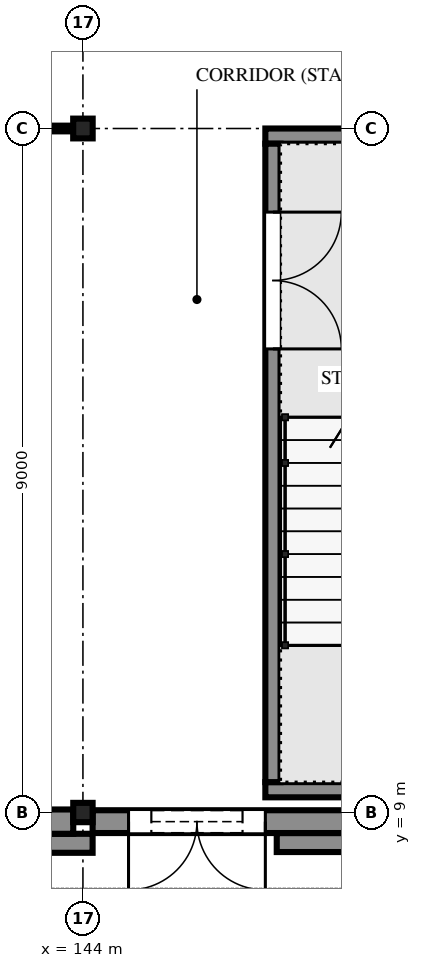
"""IFC4 building model, lengths in metres.
Left out: names, types, materials, properties, quantities, classifications, styles, units other than length and angle.
Written with IfcOpenShell. Run it as: python <this file> out.ifc"""

import sys

from ifc_helpers import new_model, si_unit, direction, frame, frame_2d, origin, origin_2d, place, context, subcontext, project, spatial, polyline, rectangle, i_section, outline, extrude, element, fill, save


model = new_model("IFC4")
c1 = context("Model", 3, precision=1e-05, world=origin(), true_north=direction((0.0, 1.0)))
c2 = subcontext(c1, "Body", "Model", "MODEL_VIEW")
j1 = project(units=[si_unit("LENGTHUNIT", "METRE"), si_unit("PLANEANGLEUNIT", "RADIAN")], contexts=[c1])
p1 = place(None, origin())
s1 = spatial("IfcSite", under=j1, at=p1, CompositionType="ELEMENT")
p2 = place(p1, origin())
s2 = spatial("IfcBuilding", under=s1, at=p2, CompositionType="ELEMENT")
p3 = place(p2, origin())
s3 = spatial("IfcBuildingStorey", under=s2, at=p3, CompositionType="ELEMENT", Elevation=0.0)
p4 = place(p3, frame((144.0, 9.0, -2.1), z_axis=(0.0, 0.0, 1.0), x_axis=(1.0, 0.0, 0.0)))
e1 = element("IfcColumn", 1, at=p4, inside=s3, PredefinedType="COLUMN", context=c2, shape_type="SweptSolid", body=[
    extrude(i_section(OverallWidth=0.255, OverallDepth=0.254, WebThickness=0.009, FlangeThickness=0.014, FilletRadius=0.013, at=origin_2d()), origin(), (0.0, 0.0, 1.0), 9.6),
])
p5 = place(p3, frame((144.0, 18.0, -2.1), z_axis=(0.0, 0.0, 1.0), x_axis=(1.0, 0.0, 0.0)))
e2 = element("IfcColumn", 2, at=p5, inside=s3, PredefinedType="COLUMN", context=c2, shape_type="SweptSolid", body=[
    extrude(i_section(OverallWidth=0.256, OverallDepth=0.26, WebThickness=0.01, FlangeThickness=0.017, FilletRadius=0.013, at=origin_2d()), origin(), (0.0, 0.0, 1.0), 9.6),
])
p6 = place(p3, frame((135.127, 8.88, 0.0), z_axis=(0.0, 0.0, 1.0), x_axis=(1.0, 0.0, 0.0)))
e3 = element("IfcWall", 3, at=p6, inside=s3, PredefinedType="SOLIDWALL", context=c2, shape_type="SweptSolid", body=[
    extrude(rectangle(XDim=8.746, YDim=0.32, at=frame_2d((4.373, 0.0))), origin(), (0.0, 0.0, 1.0), 6.767),
])
p7 = place(p6, frame((3.473, 0.0, 0.0)))
e4 = element("IfcOpeningElement", 4, at=p7, cuts=e3, PredefinedType="OPENING", context=c2, shape_type="SweptSolid", body=[
    extrude(rectangle(XDim=1.8, YDim=2.1, at=frame_2d((0.9, 1.05))), frame((0.0, 0.17, 0.0), z_axis=(0.0, -1.0, 0.0), x_axis=(1.0, 0.0, 0.0)), (0.0, 0.0, 1.0), 0.34),
])
p8 = place(p6, frame((3.773, 0.0, 2.55)))
e5 = element("IfcOpeningElement", 5, at=p8, cuts=e3, PredefinedType="OPENING", context=c2, shape_type="SweptSolid", body=[
    extrude(rectangle(XDim=1.2, YDim=0.6, at=frame_2d((0.6, 0.3))), frame((0.0, 0.17, 0.0), z_axis=(0.0, -1.0, 0.0), x_axis=(1.0, 0.0, 0.0)), (0.0, 0.0, 1.0), 0.34),
])
p9 = place(p6, frame((0.473, 0.0, 0.9)))
e6 = element("IfcOpeningElement", 6, at=p9, cuts=e3, PredefinedType="OPENING", context=c2, shape_type="SweptSolid", body=[
    extrude(rectangle(XDim=1.8, YDim=3.6, at=frame_2d((0.9, 1.8))), frame((0.0, 0.17, 0.0), z_axis=(0.0, -1.0, 0.0), x_axis=(1.0, 0.0, 0.0)), (0.0, 0.0, 1.0), 0.34),
])
p10 = place(p6, frame((6.473, 0.0, 0.9)))
e7 = element("IfcOpeningElement", 7, at=p10, cuts=e3, PredefinedType="OPENING", context=c2, shape_type="SweptSolid", body=[
    extrude(rectangle(XDim=1.8, YDim=3.6, at=frame_2d((0.9, 1.8))), frame((0.0, 0.17, 0.0), z_axis=(0.0, -1.0, 0.0), x_axis=(1.0, 0.0, 0.0)), (0.0, 0.0, 1.0), 0.34),
])
p11 = place(p3, frame((144.127, 8.88, 0.0), z_axis=(0.0, 0.0, 1.0), x_axis=(1.0, 0.0, 0.0)))
e8 = element("IfcWall", 8, at=p11, inside=s3, PredefinedType="SOLIDWALL", context=c2, shape_type="SweptSolid", body=[
    extrude(rectangle(XDim=8.746, YDim=0.3, at=frame_2d((4.373, 0.0))), origin(), (0.0, 0.0, 1.0), 6.767),
])
p12 = place(p11, frame((0.473, 0.0, 0.0)))
e9 = element("IfcOpeningElement", 9, at=p12, cuts=e8, PredefinedType="OPENING", context=c2, shape_type="SweptSolid", body=[
    extrude(rectangle(XDim=1.8, YDim=2.4, at=frame_2d((0.9, 1.2))), frame((0.0, 0.16, 0.0), z_axis=(0.0, -1.0, 0.0), x_axis=(1.0, 0.0, 0.0)), (0.0, 0.0, 1.0), 0.32),
])
p13 = place(p11, frame((0.773, 0.0, 2.55)))
e10 = element("IfcOpeningElement", 10, at=p13, cuts=e8, PredefinedType="OPENING", context=c2, shape_type="SweptSolid", body=[
    extrude(rectangle(XDim=1.2, YDim=0.6, at=frame_2d((0.6, 0.3))), frame((0.0, 0.16, 0.0), z_axis=(0.0, -1.0, 0.0), x_axis=(1.0, 0.0, 0.0)), (0.0, 0.0, 1.0), 0.32),
])
p14 = place(p11, frame((3.923, 0.0, 1.2)))
e11 = element("IfcOpeningElement", 11, at=p14, cuts=e8, PredefinedType="OPENING", context=c2, shape_type="SweptSolid", body=[
    extrude(rectangle(XDim=0.9, YDim=1.8, at=frame_2d((0.45, 0.9))), frame((0.0, 0.16, 0.0), z_axis=(0.0, -1.0, 0.0), x_axis=(1.0, 0.0, 0.0)), (0.0, 0.0, 1.0), 0.32),
])
p15 = place(p3, frame((140.55, 8.595, 0.0), z_axis=(0.0, 0.0, 1.0), x_axis=(1.0, 0.0, 0.0)))
e12 = element("IfcWall", 12, at=p15, inside=s3, PredefinedType="SOLIDWALL", context=c2, shape_type="SweptSolid", body=[
    extrude(outline(polyline([(0.0, 0.0), (3.577, 0.0), (3.577, 6.767), (0.0, 6.767), (0.0, 0.0)]), holes=[polyline([(0.9, 0.75), (0.9, 4.5), (0.942, 4.752), (1.11, 4.968), (1.257, 5.022), (1.383, 5.166), (1.656, 5.31), (1.95, 5.4), (2.244, 5.31), (2.517, 5.166), (2.643, 5.022), (2.79, 4.968), (2.958, 4.752), (3.0, 4.5), (3.0, 0.75), (0.9, 0.75)])]), frame((0.0, 0.125, 0.0), z_axis=(0.0, -1.0, 0.0), x_axis=(1.0, 0.0, 0.0)), (0.0, 0.0, 1.0), 0.25),
])
p16 = place(p3, frame((146.55, 8.605, 0.0), z_axis=(0.0, 0.0, 1.0), x_axis=(1.0, 0.0, 0.0)))
e13 = element("IfcWall", 13, at=p16, inside=s3, PredefinedType="SOLIDWALL", context=c2, shape_type="SweptSolid", body=[
    extrude(outline(polyline([(0.0, 0.0), (6.86, 0.0), (6.86, 6.767), (0.0, 6.767), (0.0, 0.0)]), holes=[polyline([(1.35, 1.05), (1.35, 3.0), (1.374, 3.252), (1.47, 3.468), (1.554, 3.522), (1.626, 3.666), (1.782, 3.81), (1.95, 3.9), (2.118, 3.81), (2.274, 3.666), (2.346, 3.522), (2.43, 3.468), (2.526, 3.252), (2.55, 3.0), (2.55, 1.05), (1.35, 1.05)])]), frame((0.0, 0.125, 0.0), z_axis=(0.0, -1.0, 0.0), x_axis=(1.0, 0.0, 0.0)), (0.0, 0.0, 1.0), 0.25),
])
p17 = place(p3, frame((146.4, 9.3, 0.0), z_axis=(0.0, 0.0, 1.0), x_axis=(1.0, 0.0, 0.0)))
e14 = element("IfcWall", 14, at=p17, inside=s3, PredefinedType="SOLIDWALL", context=c2, shape_type="SweptSolid", body=[
    extrude(rectangle(XDim=4.2, YDim=0.2, at=frame_2d((2.1, 0.0))), origin(), (0.0, 0.0, 1.0), 6.757),
])
p18 = place(p3, frame((146.4, 17.9, 0.0), z_axis=(0.0, 0.0, 1.0), x_axis=(1.0, 0.0, 0.0)))
e15 = element("IfcWall", 15, at=p18, inside=s3, PredefinedType="SOLIDWALL", context=c2, shape_type="SweptSolid", body=[
    extrude(rectangle(XDim=4.2, YDim=0.2, at=frame_2d((2.1, 0.0))), origin(), (0.0, 0.0, 1.0), 6.757),
])
p19 = place(p18, frame((1.2, 0.0, 0.0)))
e16 = element("IfcOpeningElement", 16, at=p19, cuts=e15, PredefinedType="OPENING", context=c2, shape_type="SweptSolid", body=[
    extrude(rectangle(XDim=1.8, YDim=2.1, at=frame_2d((0.9, 1.05))), frame((0.0, 0.11, 0.0), z_axis=(0.0, -1.0, 0.0), x_axis=(1.0, 0.0, 0.0)), (0.0, 0.0, 1.0), 0.22),
])
p20 = place(p3, frame((146.5, 9.4, 0.0), z_axis=(0.0, 0.0, 1.0), x_axis=(0.0, 1.0, 0.0)))
e17 = element("IfcWall", 17, at=p20, inside=s3, PredefinedType="SOLIDWALL", context=c2, shape_type="SweptSolid", body=[
    extrude(rectangle(XDim=8.4, YDim=0.2, at=frame_2d((4.2, 0.0))), origin(), (0.0, 0.0, 1.0), 6.757),
])
p21 = place(p20, frame((5.7, 0.0, 0.0)))
e18 = element("IfcOpeningElement", 18, at=p21, cuts=e17, PredefinedType="OPENING", context=c2, shape_type="SweptSolid", body=[
    extrude(rectangle(XDim=1.8, YDim=2.1, at=frame_2d((0.9, 1.05))), frame((0.0, 0.11, 0.0), z_axis=(0.0, -1.0, 0.0), x_axis=(1.0, 0.0, 0.0)), (0.0, 0.0, 1.0), 0.22),
])
p22 = place(p3, frame((143.872, 18.0, 0.0), z_axis=(0.0, 0.0, 1.0), x_axis=(-1.0, 0.0, 0.0)))
e19 = element("IfcWall", 19, at=p22, inside=s3, PredefinedType="PARTITIONING", context=c2, shape_type="SweptSolid", body=[
    extrude(rectangle(XDim=8.744, YDim=0.075, at=frame_2d((4.372, 0.0))), origin(), (0.0, 0.0, 1.0), 6.692),
])
p23 = place(p22, frame((3.872, 0.0, 0.0)))
e20 = element("IfcOpeningElement", 20, at=p23, cuts=e19, PredefinedType="OPENING", context=c2, shape_type="SweptSolid", body=[
    extrude(rectangle(XDim=1.0, YDim=2.1, at=frame_2d((0.5, 1.05))), frame((0.0, 0.047, 0.0), z_axis=(0.0, -1.0, 0.0), x_axis=(1.0, 0.0, 0.0)), (0.0, 0.0, 1.0), 0.095),
])
p24 = place(p12, frame((1.8, 0.0, 0.0), z_axis=(0.0, 0.0, 1.0), x_axis=(-1.0, 0.0, 0.0)))
e21 = element("IfcDoor", 21, at=p24, inside=s3, OperationType="DOUBLE_DOOR_SINGLE_SWING", PredefinedType="DOOR", context=c2, shape_type="SweptSolid", body=[
    extrude(outline(polyline([(0.0, 0.0), (0.07, 0.0), (0.07, 2.33), (1.73, 2.33), (1.73, 0.0), (1.8, 0.0), (1.8, 2.4), (0.0, 2.4), (0.0, 0.0)])), frame((0.0, 0.025, 0.0), z_axis=(0.0, -1.0, 0.0), x_axis=(1.0, 0.0, 0.0)), (0.0, 0.0, 1.0), 0.05),
    extrude(outline(polyline([(0.074, 0.01), (0.897, 0.01), (0.897, 2.326), (0.074, 2.326), (0.074, 0.01)]), holes=[polyline([(0.194, 0.16), (0.777, 0.16), (0.777, 1.01), (0.194, 1.01), (0.194, 0.16)]), polyline([(0.335, 1.16), (0.635, 1.16), (0.635, 1.76), (0.335, 1.76), (0.335, 1.16)])]), frame((0.0, 0.017, 0.0), z_axis=(0.0, -1.0, 0.0), x_axis=(1.0, 0.0, 0.0)), (0.0, 0.0, 1.0), 0.035),
    extrude(rectangle(XDim=0.583, YDim=0.85, at=frame_2d((0.485, 0.585))), frame((0.0, 0.009, 0.0), z_axis=(0.0, -1.0, 0.0), x_axis=(1.0, 0.0, 0.0)), (0.0, 0.0, 1.0), 0.017),
    extrude(rectangle(XDim=0.3, YDim=0.6, at=frame_2d((0.485, 1.46))), frame((0.0, 0.006, 0.0), z_axis=(0.0, -1.0, 0.0), x_axis=(1.0, 0.0, 0.0)), (0.0, 0.0, 1.0), 0.012),
    extrude(outline(polyline([(0.903, 0.01), (1.726, 0.01), (1.726, 2.326), (0.903, 2.326), (0.903, 0.01)]), holes=[polyline([(1.023, 0.16), (1.606, 0.16), (1.606, 1.01), (1.023, 1.01), (1.023, 0.16)]), polyline([(1.165, 1.16), (1.465, 1.16), (1.465, 1.76), (1.165, 1.76), (1.165, 1.16)])]), frame((0.0, 0.017, 0.0), z_axis=(0.0, -1.0, 0.0), x_axis=(1.0, 0.0, 0.0)), (0.0, 0.0, 1.0), 0.035),
    extrude(rectangle(XDim=0.583, YDim=0.85, at=frame_2d((1.314, 0.585))), frame((0.0, 0.009, 0.0), z_axis=(0.0, -1.0, 0.0), x_axis=(1.0, 0.0, 0.0)), (0.0, 0.0, 1.0), 0.017),
    extrude(rectangle(XDim=0.3, YDim=0.6, at=frame_2d((1.314, 1.46))), frame((0.0, 0.006, 0.0), z_axis=(0.0, -1.0, 0.0), x_axis=(1.0, 0.0, 0.0)), (0.0, 0.0, 1.0), 0.012),
])
fill(e9, e21)
p25 = place(p13, origin())
e22 = element("IfcWindow", 22, at=p25, inside=s3, PartitioningType="SINGLE_PANEL", PredefinedType="WINDOW", context=c2, shape_type="SweptSolid", body=[
    extrude(outline(polyline([(0.0, 0.0), (1.2, 0.0), (1.2, 0.6), (0.0, 0.6), (0.0, 0.0)]), holes=[polyline([(0.07, 0.07), (1.13, 0.07), (1.13, 0.53), (0.07, 0.53), (0.07, 0.07)])]), frame((0.0, 0.03, 0.0), z_axis=(0.0, -1.0, 0.0), x_axis=(1.0, 0.0, 0.0)), (0.0, 0.0, 1.0), 0.06),
    extrude(outline(polyline([(0.07, 0.07), (1.13, 0.07), (1.13, 0.53), (0.07, 0.53), (0.07, 0.07)]), holes=[polyline([(0.1, 0.1), (1.1, 0.1), (1.1, 0.5), (0.1, 0.5), (0.1, 0.1)])]), frame((0.0, 0.022, 0.0), z_axis=(0.0, -1.0, 0.0), x_axis=(1.0, 0.0, 0.0)), (0.0, 0.0, 1.0), 0.045),
    extrude(rectangle(XDim=1.0, YDim=0.4, at=frame_2d((0.6, 0.3))), frame((0.0, 0.006, 0.0), z_axis=(0.0, -1.0, 0.0), x_axis=(1.0, 0.0, 0.0)), (0.0, 0.0, 1.0), 0.012),
])
fill(e10, e22)
p26 = place(p21, frame((1.8, 0.0, 0.0), z_axis=(0.0, 0.0, 1.0), x_axis=(-1.0, 0.0, 0.0)))
e23 = element("IfcDoor", 23, at=p26, inside=s3, OperationType="DOUBLE_DOOR_SINGLE_SWING", PredefinedType="DOOR", context=c2, shape_type="SweptSolid", body=[
    extrude(outline(polyline([(0.0, 0.0), (0.07, 0.0), (0.07, 2.03), (1.73, 2.03), (1.73, 0.0), (1.8, 0.0), (1.8, 2.1), (0.0, 2.1), (0.0, 0.0)])), frame((0.0, 0.025, 0.0), z_axis=(0.0, -1.0, 0.0), x_axis=(1.0, 0.0, 0.0)), (0.0, 0.0, 1.0), 0.05),
    extrude(outline(polyline([(0.074, 0.01), (0.897, 0.01), (0.897, 2.026), (0.074, 2.026), (0.074, 0.01)]), holes=[polyline([(0.194, 0.16), (0.777, 0.16), (0.777, 1.01), (0.194, 1.01), (0.194, 0.16)]), polyline([(0.335, 1.16), (0.635, 1.16), (0.635, 1.76), (0.335, 1.76), (0.335, 1.16)])]), frame((0.0, 0.017, 0.0), z_axis=(0.0, -1.0, 0.0), x_axis=(1.0, 0.0, 0.0)), (0.0, 0.0, 1.0), 0.035),
    extrude(rectangle(XDim=0.583, YDim=0.85, at=frame_2d((0.485, 0.585))), frame((0.0, 0.009, 0.0), z_axis=(0.0, -1.0, 0.0), x_axis=(1.0, 0.0, 0.0)), (0.0, 0.0, 1.0), 0.017),
    extrude(rectangle(XDim=0.3, YDim=0.6, at=frame_2d((0.485, 1.46))), frame((0.0, 0.006, 0.0), z_axis=(0.0, -1.0, 0.0), x_axis=(1.0, 0.0, 0.0)), (0.0, 0.0, 1.0), 0.012),
    extrude(outline(polyline([(0.903, 0.01), (1.726, 0.01), (1.726, 2.026), (0.903, 2.026), (0.903, 0.01)]), holes=[polyline([(1.023, 0.16), (1.606, 0.16), (1.606, 1.01), (1.023, 1.01), (1.023, 0.16)]), polyline([(1.165, 1.16), (1.465, 1.16), (1.465, 1.76), (1.165, 1.76), (1.165, 1.16)])]), frame((0.0, 0.017, 0.0), z_axis=(0.0, -1.0, 0.0), x_axis=(1.0, 0.0, 0.0)), (0.0, 0.0, 1.0), 0.035),
    extrude(rectangle(XDim=0.583, YDim=0.85, at=frame_2d((1.314, 0.585))), frame((0.0, 0.009, 0.0), z_axis=(0.0, -1.0, 0.0), x_axis=(1.0, 0.0, 0.0)), (0.0, 0.0, 1.0), 0.017),
    extrude(rectangle(XDim=0.3, YDim=0.6, at=frame_2d((1.314, 1.46))), frame((0.0, 0.006, 0.0), z_axis=(0.0, -1.0, 0.0), x_axis=(1.0, 0.0, 0.0)), (0.0, 0.0, 1.0), 0.012),
])
fill(e18, e23)
save(model, sys.argv[1])
